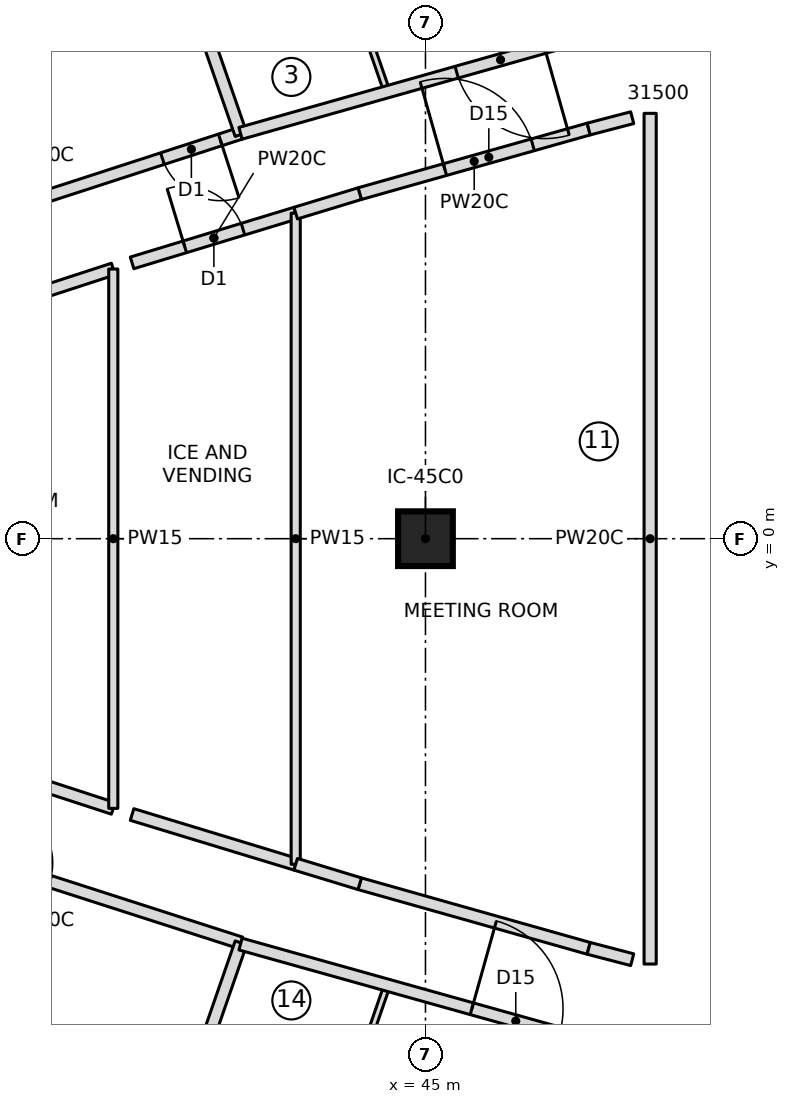
"""IFC4 building model, lengths in metres.
Left out: names, types, materials, properties, quantities, classifications, styles, units other than length and angle.
Written with IfcOpenShell. Run it as: python <this file> out.ifc"""

import sys

from ifc_helpers import new_model, si_unit, direction, frame, frame_2d, origin, origin_2d, place, context, subcontext, project, spatial, rectangle, extrude, element, fill, save


model = new_model("IFC4")
c1 = context("Model", 3, precision=1e-05, world=origin(), true_north=direction((0.0, 1.0)))
c2 = subcontext(c1, "Body", "Model", "MODEL_VIEW")
j1 = project(units=[si_unit("LENGTHUNIT", "METRE"), si_unit("PLANEANGLEUNIT", "RADIAN")], contexts=[c1])
p1 = place(None, origin())
s1 = spatial("IfcSite", under=j1, at=p1, CompositionType="ELEMENT")
p2 = place(p1, origin())
s2 = spatial("IfcBuilding", under=s1, at=p2, CompositionType="ELEMENT")
p3 = place(p2, frame((0.0, 0.0, 299.85)))
s3 = spatial("IfcBuildingStorey", under=s2, at=p3, CompositionType="ELEMENT", Elevation=299.85)
p4 = place(p3, frame((45.0, 0.0, 0.0), z_axis=(0.0, 0.0, 1.0), x_axis=(1.0, 0.0, 0.0)))
e1 = element("IfcColumn", 1, at=p4, inside=s3, PredefinedType="COLUMN", context=c2, shape_type="SweptSolid", body=[
    extrude(rectangle(XDim=0.9, YDim=0.9, at=origin_2d()), origin(), (0.0, 0.0, 1.0), 3.55),
])
p5 = place(p3, frame((41.958, 6.667, 0.0), z_axis=(0.0, 0.0, 1.0), x_axis=(-0.95118530316, -0.308620347761, 0.0)))
e2 = element("IfcWall", 2, at=p5, inside=s3, PredefinedType="PARTITIONING", context=c2, shape_type="SweptSolid", body=[
    extrude(rectangle(XDim=8.002, YDim=0.2, at=frame_2d((4.001, 0.0))), origin(), (0.0, 0.0, 1.0), 3.15),
])
p6 = place(p5, frame((0.35, 0.0, 0.0)))
e3 = element("IfcOpeningElement", 3, at=p6, cuts=e2, PredefinedType="OPENING", context=c2, shape_type="SweptSolid", body=[
    extrude(rectangle(XDim=1.0, YDim=2.1, at=frame_2d((0.5, 1.05))), frame((0.0, 0.11, 0.0), z_axis=(0.0, -1.0, 0.0), x_axis=(1.0, 0.0, 0.0)), (0.0, 0.0, 1.0), 0.22),
])
p7 = place(p3, frame((41.965, 6.648, 0.0), z_axis=(0.0, 0.0, 1.0), x_axis=(-0.327710853631, 0.944778067279, 0.0)))
e4 = element("IfcWall", 4, at=p7, inside=s3, PredefinedType="PARTITIONING", context=c2, shape_type="SweptSolid", body=[
    extrude(rectangle(XDim=9.707, YDim=0.2, at=frame_2d((4.854, 0.0))), origin(), (0.0, 0.0, 1.0), 3.15),
])
p8 = place(p3, frame((43.61, 9.536, 0.0), z_axis=(0.0, 0.0, 1.0), x_axis=(0.32773175909, -0.944770815639, 0.0)))
e5 = element("IfcWall", 5, at=p8, inside=s3, PredefinedType="PARTITIONING", context=c2, shape_type="SweptSolid", body=[
    extrude(rectangle(XDim=2.281, YDim=0.1, at=frame_2d((1.141, 0.0))), origin(), (0.0, 0.0, 1.0), 3.15),
])
p9 = place(p3, frame((34.347, -4.198, 0.0), z_axis=(0.0, 0.0, 1.0), x_axis=(0.951959334907, -0.306224467805, 0.0)))
e6 = element("IfcWall", 6, at=p9, inside=s3, PredefinedType="PARTITIONING", context=c2, shape_type="SweptSolid", body=[
    extrude(rectangle(XDim=8.002, YDim=0.2, at=frame_2d((4.001, 0.0))), origin(), (0.0, 0.0, 1.0), 3.15),
])
p10 = place(p9, frame((3.7, 0.0, 0.0)))
e7 = element("IfcOpeningElement", 7, at=p10, cuts=e6, PredefinedType="OPENING", context=c2, shape_type="SweptSolid", body=[
    extrude(rectangle(XDim=1.0, YDim=2.1, at=frame_2d((0.5, 1.05))), frame((0.0, 0.11, 0.0), z_axis=(0.0, -1.0, 0.0), x_axis=(1.0, 0.0, 0.0)), (0.0, 0.0, 1.0), 0.22),
])
p11 = place(p3, frame((38.784, -15.82, 0.0), z_axis=(0.0, 0.0, 1.0), x_axis=(0.327710853631, 0.944778067279, 0.0)))
e8 = element("IfcWall", 8, at=p11, inside=s3, PredefinedType="PARTITIONING", context=c2, shape_type="SweptSolid", body=[
    extrude(rectangle(XDim=9.707, YDim=0.2, at=frame_2d((4.854, 0.0))), origin(), (0.0, 0.0, 1.0), 3.15),
])
p12 = place(p3, frame((44.357, -7.381, 0.0), z_axis=(0.0, 0.0, 1.0), x_axis=(-0.32773175909, -0.944770815639, 0.0)))
e9 = element("IfcWall", 9, at=p12, inside=s3, PredefinedType="PARTITIONING", context=c2, shape_type="SweptSolid", body=[
    extrude(rectangle(XDim=2.281, YDim=0.1, at=frame_2d((1.141, 0.0))), origin(), (0.0, 0.0, 1.0), 3.15),
])
p13 = place(p3, frame((39.866, -4.435, 0.0), z_axis=(0.0, 0.0, 1.0), x_axis=(-0.950718067733, 0.310056697535, 0.0)))
e10 = element("IfcWall", 10, at=p13, inside=s3, PredefinedType="PARTITIONING", context=c2, shape_type="SweptSolid", body=[
    extrude(rectangle(XDim=3.588, YDim=0.2, at=frame_2d((1.794, 0.0))), origin(), (0.0, 0.0, 1.0), 3.15),
])
p14 = place(p13, frame((1.294, 0.0, 0.0)))
e11 = element("IfcOpeningElement", 11, at=p14, cuts=e10, PredefinedType="OPENING", context=c2, shape_type="SweptSolid", body=[
    extrude(rectangle(XDim=1.0, YDim=2.1, at=frame_2d((0.5, 1.05))), frame((0.0, 0.11, 0.0), z_axis=(0.0, -1.0, 0.0), x_axis=(1.0, 0.0, 0.0)), (0.0, 0.0, 1.0), 0.22),
])
p15 = place(p3, frame((36.455, 3.323, 0.0), z_axis=(0.0, 0.0, 1.0), x_axis=(0.950718067733, 0.310056697535, 0.0)))
e12 = element("IfcWall", 12, at=p15, inside=s3, PredefinedType="PARTITIONING", context=c2, shape_type="SweptSolid", body=[
    extrude(rectangle(XDim=3.588, YDim=0.2, at=frame_2d((1.794, 0.0))), origin(), (0.0, 0.0, 1.0), 3.15),
])
p16 = place(p3, frame((39.866, -4.435, 0.0), z_axis=(0.0, 0.0, 1.0), x_axis=(0.0, 1.0, 0.0)))
e13 = element("IfcWall", 13, at=p16, inside=s3, PredefinedType="PARTITIONING", context=c2, shape_type="SweptSolid", body=[
    extrude(rectangle(XDim=8.871, YDim=0.15, at=frame_2d((4.435, 0.0))), origin(), (0.0, 0.0, 1.0), 3.15),
])
p17 = place(p3, frame((40.175, 4.536, 0.0), z_axis=(0.0, 0.0, 1.0), x_axis=(0.956742178936, 0.290937111838, 0.0)))
e14 = element("IfcWall", 14, at=p17, inside=s3, PredefinedType="PARTITIONING", context=c2, shape_type="SweptSolid", body=[
    extrude(rectangle(XDim=2.813, YDim=0.2, at=frame_2d((1.406, 0.0))), origin(), (0.0, 0.0, 1.0), 3.15),
])
p18 = place(p17, frame((0.906, 0.0, 0.0)))
e15 = element("IfcOpeningElement", 15, at=p18, cuts=e14, PredefinedType="OPENING", context=c2, shape_type="SweptSolid", body=[
    extrude(rectangle(XDim=1.0, YDim=2.1, at=frame_2d((0.5, 1.05))), frame((0.0, 0.11, 0.0), z_axis=(0.0, -1.0, 0.0), x_axis=(1.0, 0.0, 0.0)), (0.0, 0.0, 1.0), 0.22),
])
p19 = place(p3, frame((42.866, -5.354, 0.0), z_axis=(0.0, 0.0, 1.0), x_axis=(-0.956742178936, 0.290937111838, 0.0)))
e16 = element("IfcWall", 16, at=p19, inside=s3, PredefinedType="PARTITIONING", context=c2, shape_type="SweptSolid", body=[
    extrude(rectangle(XDim=2.813, YDim=0.2, at=frame_2d((1.406, 0.0))), origin(), (0.0, 0.0, 1.0), 3.15),
])
p20 = place(p3, frame((42.866, -5.354, 0.0), z_axis=(0.0, 0.0, 1.0), x_axis=(0.0, 1.0, 0.0)))
e17 = element("IfcWall", 17, at=p20, inside=s3, PredefinedType="PARTITIONING", context=c2, shape_type="SweptSolid", body=[
    extrude(rectangle(XDim=10.709, YDim=0.15, at=frame_2d((5.354, 0.0))), origin(), (0.0, 0.0, 1.0), 3.15),
])
p21 = place(p3, frame((43.918, 5.675, 0.0), z_axis=(0.0, 0.0, 1.0), x_axis=(0.962411212211, 0.271596499628, 0.0)))
e18 = element("IfcWall", 18, at=p21, inside=s3, PredefinedType="PARTITIONING", context=c2, shape_type="SweptSolid", body=[
    extrude(rectangle(XDim=3.913, YDim=0.2, at=frame_2d((1.957, 0.0))), origin(), (0.0, 0.0, 1.0), 3.15),
])
p22 = place(p21, frame((1.457, 0.0, 0.0)))
e19 = element("IfcOpeningElement", 19, at=p22, cuts=e18, PredefinedType="OPENING", context=c2, shape_type="SweptSolid", body=[
    extrude(rectangle(XDim=1.5, YDim=2.1, at=frame_2d((0.75, 1.05))), frame((0.0, 0.11, 0.0), z_axis=(0.0, -1.0, 0.0), x_axis=(1.0, 0.0, 0.0)), (0.0, 0.0, 1.0), 0.22),
])
p23 = place(p3, frame((47.684, -6.738, 0.0), z_axis=(0.0, 0.0, 1.0), x_axis=(-0.962411212211, 0.271596499628, 0.0)))
e20 = element("IfcWall", 20, at=p23, inside=s3, PredefinedType="PARTITIONING", context=c2, shape_type="SweptSolid", body=[
    extrude(rectangle(XDim=3.913, YDim=0.2, at=frame_2d((1.957, 0.0))), origin(), (0.0, 0.0, 1.0), 3.15),
])
for number, where, z_axis, x_axis in (
    (21, (43.918, -5.675, 0.0), (0.0, 0.0, 1.0), (-0.957, 0.291, 0.0)),
    (22, (42.866, 5.354, 0.0), (0.0, 0.0, 1.0), (0.957, 0.291, 0.0)),
):
    element("IfcWall", number, at=place(p3, frame(where, z_axis=z_axis, x_axis=x_axis)), inside=s3, PredefinedType="PARTITIONING", context=c2, shape_type="SweptSolid", body=[
        extrude(rectangle(XDim=1.1, YDim=0.2, at=frame_2d((0.55, 0.0))), origin(), (0.0, 0.0, 1.0), 3.15),
    ])
p24 = place(p3, frame((48.4, 8.488, 0.0), z_axis=(0.0, 0.0, 1.0), x_axis=(-0.962293631271, -0.272012807081, 0.0)))
e23 = element("IfcWall", 23, at=p24, inside=s3, PredefinedType="PARTITIONING", context=c2, shape_type="SweptSolid", body=[
    extrude(rectangle(XDim=6.694, YDim=0.2, at=frame_2d((3.347, 0.0))), origin(), (0.0, 0.0, 1.0), 3.15),
])
p25 = place(p24, frame((1.5, 0.0, 0.0)))
e24 = element("IfcOpeningElement", 24, at=p25, cuts=e23, PredefinedType="OPENING", context=c2, shape_type="SweptSolid", body=[
    extrude(rectangle(XDim=1.5, YDim=2.1, at=frame_2d((0.75, 1.05))), frame((0.0, 0.11, 0.0), z_axis=(0.0, -1.0, 0.0), x_axis=(1.0, 0.0, 0.0)), (0.0, 0.0, 1.0), 0.22),
])
p26 = place(p3, frame((41.958, -6.667, 0.0), z_axis=(0.0, 0.0, 1.0), x_axis=(0.963063656884, -0.269273824925, 0.0)))
e25 = element("IfcWall", 25, at=p26, inside=s3, PredefinedType="PARTITIONING", context=c2, shape_type="SweptSolid", body=[
    extrude(rectangle(XDim=6.688, YDim=0.2, at=frame_2d((3.344, 0.0))), origin(), (0.0, 0.0, 1.0), 3.15),
])
p27 = place(p26, frame((3.95, 0.0, 0.0)))
e26 = element("IfcOpeningElement", 26, at=p27, cuts=e25, PredefinedType="OPENING", context=c2, shape_type="SweptSolid", body=[
    extrude(rectangle(XDim=1.5, YDim=2.1, at=frame_2d((0.75, 1.05))), frame((0.0, 0.11, 0.0), z_axis=(0.0, -1.0, 0.0), x_axis=(1.0, 0.0, 0.0)), (0.0, 0.0, 1.0), 0.22),
])
for number, where, z_axis, x_axis in (
    (27, (47.684, 6.738, 0.0), (0.0, 0.0, 1.0), (0.968, 0.253, 0.0)),
    (28, (48.4, -6.924, 0.0), (0.0, 0.0, 1.0), (-0.968, 0.253, 0.0)),
):
    element("IfcWall", number, at=place(p3, frame(where, z_axis=z_axis, x_axis=x_axis)), inside=s3, PredefinedType="PARTITIONING", context=c2, shape_type="SweptSolid", body=[
        extrude(rectangle(XDim=0.74, YDim=0.2, at=frame_2d((0.37, 0.0))), origin(), (0.0, 0.0, 1.0), 3.15),
    ])
p28 = place(p3, frame((48.695, 6.996, 0.0), z_axis=(0.0, 0.0, 1.0), x_axis=(0.0, -1.0, 0.0)))
e29 = element("IfcWall", 29, at=p28, inside=s3, PredefinedType="PARTITIONING", context=c2, shape_type="SweptSolid", body=[
    extrude(rectangle(XDim=13.992, YDim=0.2, at=frame_2d((6.996, 0.0))), origin(), (0.0, 0.0, 1.0), 3.15),
])
p29 = place(p6, origin())
e30 = element("IfcDoor", 30, at=p29, inside=s3, OperationType="SINGLE_SWING_LEFT", PredefinedType="DOOR", context=c2, shape_type="SweptSolid", body=[
    extrude(rectangle(XDim=1.0, YDim=2.1, at=frame_2d((0.5, 1.05))), frame((0.0, 0.025, 0.0), z_axis=(0.0, -1.0, 0.0), x_axis=(1.0, 0.0, 0.0)), (0.0, 0.0, 1.0), 0.05),
])
fill(e3, e30)
p30 = place(p25, origin())
e31 = element("IfcDoor", 31, at=p30, inside=s3, OperationType="DOUBLE_DOOR_SINGLE_SWING", PredefinedType="DOOR", context=c2, shape_type="SweptSolid", body=[
    extrude(rectangle(XDim=1.5, YDim=2.1, at=frame_2d((0.75, 1.05))), frame((0.0, 0.025, 0.0), z_axis=(0.0, -1.0, 0.0), x_axis=(1.0, 0.0, 0.0)), (0.0, 0.0, 1.0), 0.05),
])
fill(e24, e31)
p31 = place(p27, origin())
e32 = element("IfcDoor", 32, at=p31, inside=s3, OperationType="DOUBLE_DOOR_SINGLE_SWING", PredefinedType="DOOR", context=c2, shape_type="SweptSolid", body=[
    extrude(rectangle(XDim=1.5, YDim=2.1, at=frame_2d((0.75, 1.05))), frame((0.0, 0.025, 0.0), z_axis=(0.0, -1.0, 0.0), x_axis=(1.0, 0.0, 0.0)), (0.0, 0.0, 1.0), 0.05),
])
fill(e26, e32)
p32 = place(p18, origin())
e33 = element("IfcDoor", 33, at=p32, inside=s3, OperationType="SINGLE_SWING_LEFT", PredefinedType="DOOR", context=c2, shape_type="SweptSolid", body=[
    extrude(rectangle(XDim=1.0, YDim=2.1, at=frame_2d((0.5, 1.05))), frame((0.0, 0.025, 0.0), z_axis=(0.0, -1.0, 0.0), x_axis=(1.0, 0.0, 0.0)), (0.0, 0.0, 1.0), 0.05),
])
fill(e15, e33)
p33 = place(p22, origin())
e34 = element("IfcDoor", 34, at=p33, inside=s3, OperationType="DOUBLE_DOOR_SINGLE_SWING", PredefinedType="DOOR", context=c2, shape_type="SweptSolid", body=[
    extrude(rectangle(XDim=1.5, YDim=2.1, at=frame_2d((0.75, 1.05))), frame((0.0, 0.025, 0.0), z_axis=(0.0, -1.0, 0.0), x_axis=(1.0, 0.0, 0.0)), (0.0, 0.0, 1.0), 0.05),
])
fill(e19, e34)
save(model, sys.argv[1])
